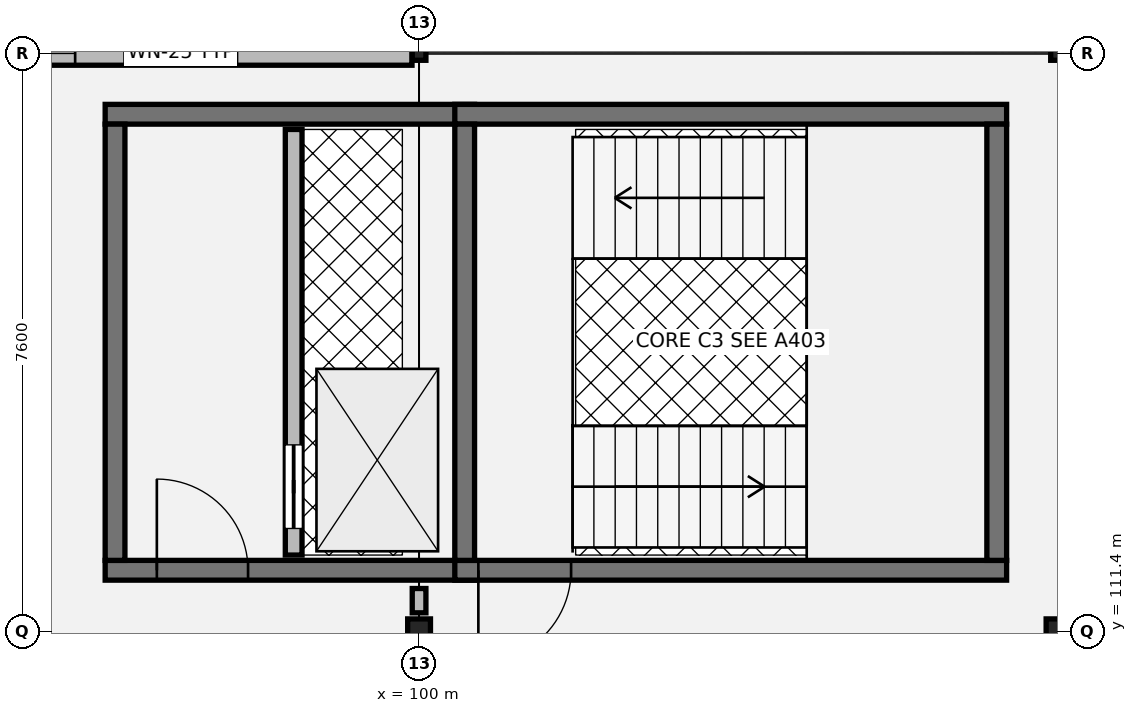
"""IFC4 building model, lengths in metres.
Left out: names, types, materials, properties, quantities, classifications, styles, units other than length and angle.
Written with IfcOpenShell. Run it as: python <this file> out.ifc"""

import sys

from ifc_helpers import new_model, si_unit, direction, frame, frame_2d, origin, origin_2d, place, context, subcontext, project, spatial, rectangle, hollow_rectangle, i_section, extrude, element, fill, save


model = new_model("IFC4")
c1 = context("Model", 3, precision=1e-05, world=origin(), true_north=direction((0.0, 1.0)))
c2 = subcontext(c1, "Body", "Model", "MODEL_VIEW")
j1 = project(units=[si_unit("LENGTHUNIT", "METRE"), si_unit("PLANEANGLEUNIT", "RADIAN")], contexts=[c1])
p1 = place(None, origin())
s1 = spatial("IfcSite", under=j1, at=p1, CompositionType="ELEMENT")
p2 = place(p1, origin())
s2 = spatial("IfcBuilding", under=s1, at=p2, CompositionType="ELEMENT")
p3 = place(p2, frame((0.0, 0.0, 17.34)))
s3 = spatial("IfcBuildingStorey", under=s2, at=p3, CompositionType="ELEMENT", Elevation=17.34)
p4 = place(p3, frame((100.0, 111.4, 0.0), z_axis=(0.0, 0.0, 1.0), x_axis=(1.0, 0.0, 0.0)))
e1 = element("IfcColumn", 1, at=p4, inside=s3, PredefinedType="COLUMN", context=c2, shape_type="SweptSolid", body=[
    extrude(i_section(OverallWidth=0.3, OverallDepth=0.32, WebThickness=0.011, FlangeThickness=0.021, at=origin_2d()), origin(), (0.0, 0.0, 1.0), 4.055),
])
p5 = place(p3, frame((100.0, 119.0, 0.0), z_axis=(0.0, 0.0, 1.0), x_axis=(1.0, 0.0, 0.0)))
e2 = element("IfcColumn", 2, at=p5, inside=s3, PredefinedType="COLUMN", context=c2, shape_type="SweptSolid", body=[
    extrude(hollow_rectangle(XDim=0.18, YDim=0.18, WallThickness=0.01, at=origin_2d()), origin(), (0.0, 0.0, 1.0), 4.055),
])
p6 = place(p3, frame((108.4, 111.4, 0.0), z_axis=(0.0, 0.0, 1.0), x_axis=(1.0, 0.0, 0.0)))
e3 = element("IfcColumn", 3, at=p6, inside=s3, PredefinedType="COLUMN", context=c2, shape_type="SweptSolid", body=[
    extrude(i_section(OverallWidth=0.3, OverallDepth=0.32, WebThickness=0.011, FlangeThickness=0.021, at=origin_2d()), origin(), (0.0, 0.0, 1.0), 4.055),
])
p7 = place(p3, frame((108.4, 119.0, 0.0), z_axis=(0.0, 0.0, 1.0), x_axis=(1.0, 0.0, 0.0)))
e4 = element("IfcColumn", 4, at=p7, inside=s3, PredefinedType="COLUMN", context=c2, shape_type="SweptSolid", body=[
    extrude(hollow_rectangle(XDim=0.18, YDim=0.18, WallThickness=0.01, at=origin_2d()), origin(), (0.0, 0.0, 1.0), 4.055),
])
p8 = place(p3, frame((99.907, 119.0, 0.0), z_axis=(0.0, 0.0, 1.0), x_axis=(-1.0, 0.0, 0.0)))
e5 = element("IfcWall", 5, at=p8, inside=s3, PredefinedType="SOLIDWALL", context=c2, shape_type="SweptSolid", body=[
    extrude(rectangle(XDim=8.214, YDim=0.31, at=frame_2d((4.107, 0.0))), origin(), (0.0, 0.0, 1.0), 3.48),
])
p9 = place(p8, frame((2.302, 0.0, 0.8)))
e6 = element("IfcOpeningElement", 6, at=p9, cuts=e5, PredefinedType="OPENING", context=c2, shape_type="SweptSolid", body=[
    extrude(rectangle(XDim=1.48, YDim=2.16, at=frame_2d((0.74, 1.08))), frame((0.0, 0.165, 0.0), z_axis=(0.0, -1.0, 0.0), x_axis=(1.0, 0.0, 0.0)), (0.0, 0.0, 1.0), 0.33),
])
p10 = place(p8, frame((4.432, 0.0, 0.8)))
e7 = element("IfcOpeningElement", 7, at=p10, cuts=e5, PredefinedType="OPENING", context=c2, shape_type="SweptSolid", body=[
    extrude(rectangle(XDim=1.48, YDim=2.16, at=frame_2d((0.74, 1.08))), frame((0.0, 0.165, 0.0), z_axis=(0.0, -1.0, 0.0), x_axis=(1.0, 0.0, 0.0)), (0.0, 0.0, 1.0), 0.33),
])
p11 = place(p3, frame((95.87, 112.2, 0.0), z_axis=(0.0, 0.0, 1.0), x_axis=(1.0, 0.0, 0.0)))
e8 = element("IfcWall", 8, at=p11, inside=s3, PredefinedType="SHEAR", context=c2, shape_type="SweptSolid", body=[
    extrude(rectangle(XDim=4.86, YDim=0.26, at=frame_2d((2.43, 0.0))), origin(), (0.0, 0.0, 1.0), 3.845),
])
p12 = place(p11, frame((0.68, 0.0, 0.0)))
e9 = element("IfcOpeningElement", 9, at=p12, cuts=e8, PredefinedType="OPENING", context=c2, shape_type="SweptSolid", body=[
    extrude(rectangle(XDim=1.2, YDim=2.16, at=frame_2d((0.6, 1.08))), frame((0.0, 0.14, 0.0), z_axis=(0.0, -1.0, 0.0), x_axis=(1.0, 0.0, 0.0)), (0.0, 0.0, 1.0), 0.28),
])
p13 = place(p3, frame((100.73, 118.2, 0.0), z_axis=(0.0, 0.0, 1.0), x_axis=(-1.0, 0.0, 0.0)))
e10 = element("IfcWall", 10, at=p13, inside=s3, PredefinedType="SHEAR", context=c2, shape_type="SweptSolid", body=[
    extrude(rectangle(XDim=4.86, YDim=0.26, at=frame_2d((2.43, 0.0))), origin(), (0.0, 0.0, 1.0), 3.845),
])
p14 = place(p3, frame((96.0, 118.07, 0.0), z_axis=(0.0, 0.0, 1.0), x_axis=(0.0, -1.0, 0.0)))
e11 = element("IfcWall", 11, at=p14, inside=s3, PredefinedType="SHEAR", context=c2, shape_type="SweptSolid", body=[
    extrude(rectangle(XDim=5.74, YDim=0.26, at=frame_2d((2.87, 0.0))), origin(), (0.0, 0.0, 1.0), 3.845),
])
p15 = place(p3, frame((98.35, 112.4, 0.0), z_axis=(0.0, 0.0, 1.0), x_axis=(0.0, 1.0, 0.0)))
e12 = element("IfcWall", 12, at=p15, inside=s3, PredefinedType="SOLIDWALL", context=c2, shape_type="SweptSolid", body=[
    extrude(rectangle(XDim=5.6, YDim=0.22, at=frame_2d((2.8, 0.0))), origin(), (0.0, 0.0, 1.0), 3.845),
])
p16 = place(p15, frame((0.35, 0.0, 0.0)))
e13 = element("IfcOpeningElement", 13, at=p16, cuts=e12, PredefinedType="OPENING", context=c2, shape_type="SweptSolid", body=[
    extrude(rectangle(XDim=1.1, YDim=2.15, at=frame_2d((0.55, 1.075))), frame((0.0, 0.12, 0.0), z_axis=(0.0, -1.0, 0.0), x_axis=(1.0, 0.0, 0.0)), (0.0, 0.0, 1.0), 0.24),
])
p17 = place(p3, frame((100.47, 112.2, 0.0), z_axis=(0.0, 0.0, 1.0), x_axis=(1.0, 0.0, 0.0)))
e14 = element("IfcWall", 14, at=p17, inside=s3, PredefinedType="SHEAR", context=c2, shape_type="SweptSolid", body=[
    extrude(rectangle(XDim=7.26, YDim=0.26, at=frame_2d((3.63, 0.0))), origin(), (0.0, 0.0, 1.0), 3.845),
])
p18 = place(p17, frame((0.31, 0.0, 0.0)))
e15 = element("IfcOpeningElement", 15, at=p18, cuts=e14, PredefinedType="OPENING", context=c2, shape_type="SweptSolid", body=[
    extrude(rectangle(XDim=1.22, YDim=2.18, at=frame_2d((0.61, 1.09))), frame((0.0, 0.14, 0.0), z_axis=(0.0, -1.0, 0.0), x_axis=(1.0, 0.0, 0.0)), (0.0, 0.0, 1.0), 0.28),
])
p19 = place(p3, frame((100.47, 118.2, 0.0), z_axis=(0.0, 0.0, 1.0), x_axis=(1.0, 0.0, 0.0)))
e16 = element("IfcWall", 16, at=p19, inside=s3, PredefinedType="SHEAR", context=c2, shape_type="SweptSolid", body=[
    extrude(rectangle(XDim=7.26, YDim=0.26, at=frame_2d((3.63, 0.0))), origin(), (0.0, 0.0, 1.0), 3.845),
])
for number, where, z_axis, x_axis in (
    (17, (100.6, 112.33, 0.0), (0.0, 0.0, 1.0), (0.0, 1.0, 0.0)),
    (18, (107.6, 112.33, 0.0), (0.0, 0.0, 1.0), (0.0, 1.0, 0.0)),
):
    element("IfcWall", number, at=place(p3, frame(where, z_axis=z_axis, x_axis=x_axis)), inside=s3, PredefinedType="SHEAR", context=c2, shape_type="SweptSolid", body=[
        extrude(rectangle(XDim=5.74, YDim=0.26, at=frame_2d((2.87, 0.0))), origin(), (0.0, 0.0, 1.0), 3.845),
    ])
p20 = place(p3, frame((100.0, 111.64, 0.0), z_axis=(0.0, 0.0, 1.0), x_axis=(0.0, 1.0, 0.0)))
e19 = element("IfcWall", 19, at=p20, inside=s3, PredefinedType="PARTITIONING", context=c2, shape_type="SweptSolid", body=[
    extrude(rectangle(XDim=0.32, YDim=0.18, at=frame_2d((0.16, 0.0))), origin(), (0.0, 0.0, 1.0), 3.18),
])
p21 = place(p9, origin())
e20 = element("IfcWindow", 20, at=p21, inside=s3, PartitioningType="SINGLE_PANEL", PredefinedType="WINDOW", context=c2, shape_type="SweptSolid", body=[
    extrude(rectangle(XDim=1.48, YDim=2.16, at=frame_2d((0.74, 1.08))), frame((0.0, 0.03, 0.0), z_axis=(0.0, -1.0, 0.0), x_axis=(1.0, 0.0, 0.0)), (0.0, 0.0, 1.0), 0.06),
])
fill(e6, e20)
p22 = place(p10, origin())
e21 = element("IfcWindow", 21, at=p22, inside=s3, PartitioningType="SINGLE_PANEL", PredefinedType="WINDOW", context=c2, shape_type="SweptSolid", body=[
    extrude(rectangle(XDim=1.48, YDim=2.16, at=frame_2d((0.74, 1.08))), frame((0.0, 0.03, 0.0), z_axis=(0.0, -1.0, 0.0), x_axis=(1.0, 0.0, 0.0)), (0.0, 0.0, 1.0), 0.06),
])
fill(e7, e21)
p23 = place(p12, origin())
e22 = element("IfcDoor", 22, at=p23, inside=s3, OperationType="SINGLE_SWING_LEFT", PredefinedType="DOOR", context=c2, shape_type="SweptSolid", body=[
    extrude(rectangle(XDim=1.2, YDim=2.16, at=frame_2d((0.6, 1.08))), frame((0.0, 0.025, 0.0), z_axis=(0.0, -1.0, 0.0), x_axis=(1.0, 0.0, 0.0)), (0.0, 0.0, 1.0), 0.05),
])
fill(e9, e22)
p24 = place(p16, origin())
e23 = element("IfcDoor", 23, at=p24, inside=s3, OperationType="SLIDING_TO_LEFT", PredefinedType="DOOR", context=c2, shape_type="SweptSolid", body=[
    extrude(rectangle(XDim=1.1, YDim=2.15, at=frame_2d((0.55, 1.075))), frame((0.0, 0.025, 0.0), z_axis=(0.0, -1.0, 0.0), x_axis=(1.0, 0.0, 0.0)), (0.0, 0.0, 1.0), 0.05),
])
fill(e13, e23)
p25 = place(p18, origin())
e24 = element("IfcDoor", 24, at=p25, inside=s3, OperationType="SINGLE_SWING_RIGHT", PredefinedType="DOOR", context=c2, shape_type="SweptSolid", body=[
    extrude(rectangle(XDim=1.22, YDim=2.18, at=frame_2d((0.61, 1.09))), frame((0.0, 0.025, 0.0), z_axis=(0.0, -1.0, 0.0), x_axis=(1.0, 0.0, 0.0)), (0.0, 0.0, 1.0), 0.05),
])
fill(e15, e24)
save(model, sys.argv[1])
